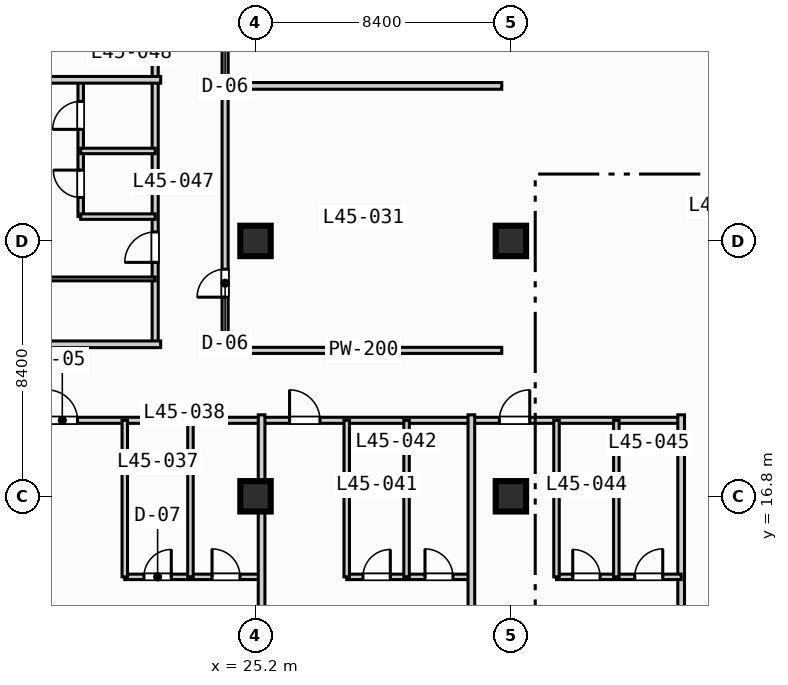
"""IFC4 building model, lengths in metres.
Left out: names, types, materials, properties, quantities, classifications, styles, units other than length and angle.
Written with IfcOpenShell. Run it as: python <this file> out.ifc"""

import sys

from ifc_helpers import new_model, si_unit, direction, frame, frame_2d, origin, origin_2d, place, context, subcontext, project, spatial, rectangle, extrude, element, fill, save


model = new_model("IFC4")
c1 = context("Model", 3, precision=1e-05, world=origin(), true_north=direction((0.0, 1.0)))
c2 = subcontext(c1, "Body", "Model", "MODEL_VIEW")
j1 = project(units=[si_unit("LENGTHUNIT", "METRE"), si_unit("PLANEANGLEUNIT", "RADIAN")], contexts=[c1])
p1 = place(None, origin())
s1 = spatial("IfcSite", under=j1, at=p1, CompositionType="ELEMENT")
p2 = place(p1, origin())
s2 = spatial("IfcBuilding", under=s1, at=p2, CompositionType="ELEMENT")
p3 = place(p2, frame((0.0, 0.0, 186.5)))
s3 = spatial("IfcBuildingStorey", under=s2, at=p3, CompositionType="ELEMENT", Elevation=186.5)
for number, where, z_axis, x_axis in (
    (1, (25.2, 16.8, 0.0), (0.0, 0.0, 1.0), (1.0, 0.0, 0.0)),
    (2, (25.2, 25.2, 0.0), (0.0, 0.0, 1.0), (1.0, 0.0, 0.0)),
    (3, (33.6, 16.8, 0.0), (0.0, 0.0, 1.0), (1.0, 0.0, 0.0)),
    (4, (33.6, 25.2, 0.0), (0.0, 0.0, 1.0), (1.0, 0.0, 0.0)),
):
    element("IfcColumn", number, at=place(p3, frame(where, z_axis=z_axis, x_axis=x_axis)), inside=s3, PredefinedType="COLUMN", context=c2, shape_type="SweptSolid", body=[
        extrude(rectangle(XDim=1.0, YDim=1.0, at=origin_2d()), origin(), (0.0, 0.0, 1.0), 3.7),
    ])
p4 = place(p3, frame((24.2, 21.6, 0.0), z_axis=(0.0, 0.0, 1.0), x_axis=(0.0, 1.0, 0.0)))
e5 = element("IfcWall", 5, at=p4, inside=s3, PredefinedType="PARTITIONING", context=c2, shape_type="SweptSolid", body=[
    extrude(rectangle(XDim=17.6, YDim=0.2, at=frame_2d((8.8, 0.0))), origin(), (0.0, 0.0, 1.0), 3.47),
])
p5 = place(p4, frame((1.75, 0.0, 0.0)))
e6 = element("IfcOpeningElement", 6, at=p5, cuts=e5, PredefinedType="OPENING", context=c2, shape_type="SweptSolid", body=[
    extrude(rectangle(XDim=0.92, YDim=2.1, at=frame_2d((0.46, 1.05))), frame((0.0, 0.11, 0.0), z_axis=(0.0, -1.0, 0.0), x_axis=(1.0, 0.0, 0.0)), (0.0, 0.0, 1.0), 0.22),
])
p6 = place(p4, frame((10.2, 0.0, 0.0)))
e7 = element("IfcOpeningElement", 7, at=p6, cuts=e5, PredefinedType="OPENING", context=c2, shape_type="SweptSolid", body=[
    extrude(rectangle(XDim=0.92, YDim=2.1, at=frame_2d((0.46, 1.05))), frame((0.0, 0.11, 0.0), z_axis=(0.0, -1.0, 0.0), x_axis=(1.0, 0.0, 0.0)), (0.0, 0.0, 1.0), 0.22),
])
p7 = place(p3, frame((24.2, 21.6, 0.0), z_axis=(0.0, 0.0, 1.0), x_axis=(1.0, 0.0, 0.0)))
e8 = element("IfcWall", 8, at=p7, inside=s3, PredefinedType="PARTITIONING", context=c2, shape_type="SweptSolid", body=[
    extrude(rectangle(XDim=9.1, YDim=0.2, at=frame_2d((4.55, 0.0))), origin(), (0.0, 0.0, 1.0), 3.47),
])
p8 = place(p3, frame((24.2, 30.3, 0.0), z_axis=(0.0, 0.0, 1.0), x_axis=(1.0, 0.0, 0.0)))
e9 = element("IfcWall", 9, at=p8, inside=s3, PredefinedType="PARTITIONING", context=c2, shape_type="SweptSolid", body=[
    extrude(rectangle(XDim=9.1, YDim=0.22, at=frame_2d((4.55, 0.0))), origin(), (0.0, 0.0, 1.0), 3.47),
])
p9 = place(p3, frame((3.4, 19.3, 0.0), z_axis=(0.0, 0.0, 1.0), x_axis=(1.0, 0.0, 0.0)))
e10 = element("IfcWall", 10, at=p9, inside=s3, PredefinedType="PARTITIONING", context=c2, shape_type="SweptSolid", body=[
    extrude(rectangle(XDim=35.8, YDim=0.2, at=frame_2d((17.9, 0.0))), origin(), (0.0, 0.0, 1.0), 3.47),
])
p10 = place(p9, frame((3.92, 0.0, 0.0)))
e11 = element("IfcOpeningElement", 11, at=p10, cuts=e10, PredefinedType="OPENING", context=c2, shape_type="SweptSolid", body=[
    extrude(rectangle(XDim=1.0, YDim=2.15, at=frame_2d((0.5, 1.075))), frame((0.0, 0.11, 0.0), z_axis=(0.0, -1.0, 0.0), x_axis=(1.0, 0.0, 0.0)), (0.0, 0.0, 1.0), 0.22),
])
p11 = place(p9, frame((14.945, 0.0, 0.0)))
e12 = element("IfcOpeningElement", 12, at=p11, cuts=e10, PredefinedType="OPENING", context=c2, shape_type="SweptSolid", body=[
    extrude(rectangle(XDim=1.0, YDim=2.15, at=frame_2d((0.5, 1.075))), frame((0.0, 0.11, 0.0), z_axis=(0.0, -1.0, 0.0), x_axis=(1.0, 0.0, 0.0)), (0.0, 0.0, 1.0), 0.22),
])
p12 = place(p9, frame((22.92, 0.0, 0.0)))
e13 = element("IfcOpeningElement", 13, at=p12, cuts=e10, PredefinedType="OPENING", context=c2, shape_type="SweptSolid", body=[
    extrude(rectangle(XDim=1.0, YDim=2.15, at=frame_2d((0.5, 1.075))), frame((0.0, 0.11, 0.0), z_axis=(0.0, -1.0, 0.0), x_axis=(1.0, 0.0, 0.0)), (0.0, 0.0, 1.0), 0.22),
])
p13 = place(p9, frame((29.82, 0.0, 0.0)))
e14 = element("IfcOpeningElement", 14, at=p13, cuts=e10, PredefinedType="OPENING", context=c2, shape_type="SweptSolid", body=[
    extrude(rectangle(XDim=1.0, YDim=2.15, at=frame_2d((0.5, 1.075))), frame((0.0, 0.11, 0.0), z_axis=(0.0, -1.0, 0.0), x_axis=(1.0, 0.0, 0.0)), (0.0, 0.0, 1.0), 0.22),
])
p14 = place(p3, frame((20.9, 14.15, 0.0), z_axis=(0.0, 0.0, 1.0), x_axis=(1.0, 0.0, 0.0)))
e15 = element("IfcWall", 15, at=p14, inside=s3, PredefinedType="PLUMBINGWALL", context=c2, shape_type="SweptSolid", body=[
    extrude(rectangle(XDim=4.5, YDim=0.18, at=frame_2d((2.25, 0.0))), origin(), (0.0, 0.0, 1.0), 3.47),
])
p15 = place(p14, frame((0.63, 0.0, 0.0)))
e16 = element("IfcOpeningElement", 16, at=p15, cuts=e15, PredefinedType="OPENING", context=c2, shape_type="SweptSolid", body=[
    extrude(rectangle(XDim=0.9, YDim=2.1, at=frame_2d((0.45, 1.05))), frame((0.0, 0.1, 0.0), z_axis=(0.0, -1.0, 0.0), x_axis=(1.0, 0.0, 0.0)), (0.0, 0.0, 1.0), 0.2),
])
p16 = place(p14, frame((2.87, 0.0, 0.0)))
e17 = element("IfcOpeningElement", 17, at=p16, cuts=e15, PredefinedType="OPENING", context=c2, shape_type="SweptSolid", body=[
    extrude(rectangle(XDim=0.92, YDim=2.1, at=frame_2d((0.46, 1.05))), frame((0.0, 0.1, 0.0), z_axis=(0.0, -1.0, 0.0), x_axis=(1.0, 0.0, 0.0)), (0.0, 0.0, 1.0), 0.2),
])
for number, where, z_axis, x_axis in (
    (18, (20.9, 14.15, 0.0), (0.0, 0.0, 1.0), (0.0, 1.0, 0.0)),
    (19, (23.06, 14.15, 0.0), (0.0, 0.0, 1.0), (0.0, 1.0, 0.0)),
):
    element("IfcWall", number, at=place(p3, frame(where, z_axis=z_axis, x_axis=x_axis)), inside=s3, PredefinedType="PLUMBINGWALL", context=c2, shape_type="SweptSolid", body=[
        extrude(rectangle(XDim=5.15, YDim=0.18, at=frame_2d((2.575, 0.0))), origin(), (0.0, 0.0, 1.0), 3.47),
    ])
p17 = place(p3, frame((25.4, 0.2, 0.0), z_axis=(0.0, 0.0, 1.0), x_axis=(0.0, 1.0, 0.0)))
e20 = element("IfcWall", 20, at=p17, inside=s3, PredefinedType="PARTITIONING", context=c2, shape_type="SweptSolid", body=[
    extrude(rectangle(XDim=19.28, YDim=0.22, at=frame_2d((9.64, 0.0))), origin(), (0.0, 0.0, 1.0), 2.82),
])
p18 = place(p3, frame((28.2, 14.15, 0.0), z_axis=(0.0, 0.0, 1.0), x_axis=(1.0, 0.0, 0.0)))
e21 = element("IfcWall", 21, at=p18, inside=s3, PredefinedType="PLUMBINGWALL", context=c2, shape_type="SweptSolid", body=[
    extrude(rectangle(XDim=4.1, YDim=0.18, at=frame_2d((2.05, 0.0))), origin(), (0.0, 0.0, 1.0), 3.47),
])
p19 = place(p18, frame((0.534, 0.0, 0.0)))
e22 = element("IfcOpeningElement", 22, at=p19, cuts=e21, PredefinedType="OPENING", context=c2, shape_type="SweptSolid", body=[
    extrude(rectangle(XDim=0.9, YDim=2.1, at=frame_2d((0.45, 1.05))), frame((0.0, 0.1, 0.0), z_axis=(0.0, -1.0, 0.0), x_axis=(1.0, 0.0, 0.0)), (0.0, 0.0, 1.0), 0.2),
])
p20 = place(p18, frame((2.574, 0.0, 0.0)))
e23 = element("IfcOpeningElement", 23, at=p20, cuts=e21, PredefinedType="OPENING", context=c2, shape_type="SweptSolid", body=[
    extrude(rectangle(XDim=0.92, YDim=2.1, at=frame_2d((0.46, 1.05))), frame((0.0, 0.1, 0.0), z_axis=(0.0, -1.0, 0.0), x_axis=(1.0, 0.0, 0.0)), (0.0, 0.0, 1.0), 0.2),
])
for number, where, z_axis, x_axis in (
    (24, (28.2, 14.15, 0.0), (0.0, 0.0, 1.0), (0.0, 1.0, 0.0)),
    (25, (30.168, 14.15, 0.0), (0.0, 0.0, 1.0), (0.0, 1.0, 0.0)),
):
    element("IfcWall", number, at=place(p3, frame(where, z_axis=z_axis, x_axis=x_axis)), inside=s3, PredefinedType="PLUMBINGWALL", context=c2, shape_type="SweptSolid", body=[
        extrude(rectangle(XDim=5.15, YDim=0.18, at=frame_2d((2.575, 0.0))), origin(), (0.0, 0.0, 1.0), 3.47),
    ])
for number, where, z_axis, x_axis in (
    (26, (32.3, 0.2, 0.0), (0.0, 0.0, 1.0), (0.0, 1.0, 0.0)),
    (27, (39.2, 0.2, 0.0), (0.0, 0.0, 1.0), (0.0, 1.0, 0.0)),
):
    element("IfcWall", number, at=place(p3, frame(where, z_axis=z_axis, x_axis=x_axis)), inside=s3, PredefinedType="PARTITIONING", context=c2, shape_type="SweptSolid", body=[
        extrude(rectangle(XDim=19.28, YDim=0.22, at=frame_2d((9.64, 0.0))), origin(), (0.0, 0.0, 1.0), 3.47),
    ])
p21 = place(p3, frame((35.1, 14.15, 0.0), z_axis=(0.0, 0.0, 1.0), x_axis=(1.0, 0.0, 0.0)))
e28 = element("IfcWall", 28, at=p21, inside=s3, PredefinedType="PLUMBINGWALL", context=c2, shape_type="SweptSolid", body=[
    extrude(rectangle(XDim=4.1, YDim=0.18, at=frame_2d((2.05, 0.0))), origin(), (0.0, 0.0, 1.0), 3.47),
])
p22 = place(p21, frame((0.534, 0.0, 0.0)))
e29 = element("IfcOpeningElement", 29, at=p22, cuts=e28, PredefinedType="OPENING", context=c2, shape_type="SweptSolid", body=[
    extrude(rectangle(XDim=0.9, YDim=2.1, at=frame_2d((0.45, 1.05))), frame((0.0, 0.1, 0.0), z_axis=(0.0, -1.0, 0.0), x_axis=(1.0, 0.0, 0.0)), (0.0, 0.0, 1.0), 0.2),
])
p23 = place(p21, frame((2.574, 0.0, 0.0)))
e30 = element("IfcOpeningElement", 30, at=p23, cuts=e28, PredefinedType="OPENING", context=c2, shape_type="SweptSolid", body=[
    extrude(rectangle(XDim=0.92, YDim=2.1, at=frame_2d((0.46, 1.05))), frame((0.0, 0.1, 0.0), z_axis=(0.0, -1.0, 0.0), x_axis=(1.0, 0.0, 0.0)), (0.0, 0.0, 1.0), 0.2),
])
for number, where, z_axis, x_axis in (
    (31, (35.1, 14.15, 0.0), (0.0, 0.0, 1.0), (0.0, 1.0, 0.0)),
    (32, (37.068, 14.15, 0.0), (0.0, 0.0, 1.0), (0.0, 1.0, 0.0)),
):
    element("IfcWall", number, at=place(p3, frame(where, z_axis=z_axis, x_axis=x_axis)), inside=s3, PredefinedType="PLUMBINGWALL", context=c2, shape_type="SweptSolid", body=[
        extrude(rectangle(XDim=5.15, YDim=0.18, at=frame_2d((2.575, 0.0))), origin(), (0.0, 0.0, 1.0), 3.47),
    ])
p24 = place(p3, frame((21.9, 21.8, 0.0), z_axis=(0.0, 0.0, 1.0), x_axis=(0.0, 1.0, 0.0)))
e33 = element("IfcWall", 33, at=p24, inside=s3, PredefinedType="PARTITIONING", context=c2, shape_type="SweptSolid", body=[
    extrude(rectangle(XDim=17.4, YDim=0.2, at=frame_2d((8.7, 0.0))), origin(), (0.0, 0.0, 1.0), 3.47),
])
p25 = place(p24, frame((2.695, 0.0, 0.0)))
e34 = element("IfcOpeningElement", 34, at=p25, cuts=e33, PredefinedType="OPENING", context=c2, shape_type="SweptSolid", body=[
    extrude(rectangle(XDim=1.0, YDim=2.15, at=frame_2d((0.5, 1.075))), frame((0.0, 0.11, 0.0), z_axis=(0.0, -1.0, 0.0), x_axis=(1.0, 0.0, 0.0)), (0.0, 0.0, 1.0), 0.22),
])
p26 = place(p24, frame((11.395, 0.0, 0.0)))
e35 = element("IfcOpeningElement", 35, at=p26, cuts=e33, PredefinedType="OPENING", context=c2, shape_type="SweptSolid", body=[
    extrude(rectangle(XDim=1.0, YDim=2.15, at=frame_2d((0.5, 1.075))), frame((0.0, 0.11, 0.0), z_axis=(0.0, -1.0, 0.0), x_axis=(1.0, 0.0, 0.0)), (0.0, 0.0, 1.0), 0.22),
])
p27 = place(p3, frame((0.2, 21.8, 0.0), z_axis=(0.0, 0.0, 1.0), x_axis=(1.0, 0.0, 0.0)))
e36 = element("IfcWall", 36, at=p27, inside=s3, PredefinedType="PARTITIONING", context=c2, shape_type="SweptSolid", body=[
    extrude(rectangle(XDim=21.88, YDim=0.22, at=frame_2d((10.94, 0.0))), origin(), (0.0, 0.0, 1.0), 3.47),
])
p28 = place(p3, frame((19.45, 26.0, 0.0), z_axis=(0.0, 0.0, 1.0), x_axis=(0.0, 1.0, 0.0)))
e37 = element("IfcWall", 37, at=p28, inside=s3, PredefinedType="PLUMBINGWALL", context=c2, shape_type="SweptSolid", body=[
    extrude(rectangle(XDim=4.5, YDim=0.18, at=frame_2d((2.25, 0.0))), origin(), (0.0, 0.0, 1.0), 3.47),
])
p29 = place(p28, frame((0.63, 0.0, 0.0)))
e38 = element("IfcOpeningElement", 38, at=p29, cuts=e37, PredefinedType="OPENING", context=c2, shape_type="SweptSolid", body=[
    extrude(rectangle(XDim=0.9, YDim=2.1, at=frame_2d((0.45, 1.05))), frame((0.0, 0.1, 0.0), z_axis=(0.0, -1.0, 0.0), x_axis=(1.0, 0.0, 0.0)), (0.0, 0.0, 1.0), 0.2),
])
p30 = place(p28, frame((2.87, 0.0, 0.0)))
e39 = element("IfcOpeningElement", 39, at=p30, cuts=e37, PredefinedType="OPENING", context=c2, shape_type="SweptSolid", body=[
    extrude(rectangle(XDim=0.92, YDim=2.1, at=frame_2d((0.46, 1.05))), frame((0.0, 0.1, 0.0), z_axis=(0.0, -1.0, 0.0), x_axis=(1.0, 0.0, 0.0)), (0.0, 0.0, 1.0), 0.2),
])
for number, where, z_axis, x_axis in (
    (40, (19.45, 26.0, 0.0), (0.0, 0.0, 1.0), (1.0, 0.0, 0.0)),
    (41, (19.45, 28.16, 0.0), (0.0, 0.0, 1.0), (1.0, 0.0, 0.0)),
):
    element("IfcWall", number, at=place(p3, frame(where, z_axis=z_axis, x_axis=x_axis)), inside=s3, PredefinedType="PLUMBINGWALL", context=c2, shape_type="SweptSolid", body=[
        extrude(rectangle(XDim=2.45, YDim=0.18, at=frame_2d((1.225, 0.0))), origin(), (0.0, 0.0, 1.0), 3.47),
    ])
p31 = place(p3, frame((0.35, 23.95, 0.0), z_axis=(0.0, 0.0, 1.0), x_axis=(1.0, 0.0, 0.0)))
e42 = element("IfcWall", 42, at=p31, inside=s3, PredefinedType="PARTITIONING", context=c2, shape_type="SweptSolid", body=[
    extrude(rectangle(XDim=21.55, YDim=0.125, at=frame_2d((10.775, 0.0))), origin(), (0.0, 0.0, 1.0), 3.47),
])
p32 = place(p31, frame((9.09, 0.0, 0.0)))
e43 = element("IfcOpeningElement", 43, at=p32, cuts=e42, PredefinedType="OPENING", context=c2, shape_type="SweptSolid", body=[
    extrude(rectangle(XDim=0.92, YDim=2.1, at=frame_2d((0.46, 1.05))), frame((0.0, 0.073, 0.0), z_axis=(0.0, -1.0, 0.0), x_axis=(1.0, 0.0, 0.0)), (0.0, 0.0, 1.0), 0.145),
])
p33 = place(p3, frame((0.2, 30.5, 0.0), z_axis=(0.0, 0.0, 1.0), x_axis=(1.0, 0.0, 0.0)))
e44 = element("IfcWall", 44, at=p33, inside=s3, PredefinedType="PARTITIONING", context=c2, shape_type="SweptSolid", body=[
    extrude(rectangle(XDim=21.88, YDim=0.22, at=frame_2d((10.94, 0.0))), origin(), (0.0, 0.0, 1.0), 3.47),
])
p34 = place(p5, origin())
e45 = element("IfcDoor", 45, at=p34, inside=s3, OperationType="SINGLE_SWING_LEFT", PredefinedType="DOOR", context=c2, shape_type="SweptSolid", body=[
    extrude(rectangle(XDim=0.92, YDim=2.1, at=frame_2d((0.46, 1.05))), frame((0.0, 0.025, 0.0), z_axis=(0.0, -1.0, 0.0), x_axis=(1.0, 0.0, 0.0)), (0.0, 0.0, 1.0), 0.05),
])
fill(e6, e45)
p35 = place(p11, origin())
e46 = element("IfcDoor", 46, at=p35, inside=s3, OperationType="SINGLE_SWING_LEFT", PredefinedType="DOOR", context=c2, shape_type="SweptSolid", body=[
    extrude(rectangle(XDim=1.0, YDim=2.15, at=frame_2d((0.5, 1.075))), frame((0.0, 0.025, 0.0), z_axis=(0.0, -1.0, 0.0), x_axis=(1.0, 0.0, 0.0)), (0.0, 0.0, 1.0), 0.05),
])
fill(e12, e46)
p36 = place(p12, origin())
e47 = element("IfcDoor", 47, at=p36, inside=s3, OperationType="SINGLE_SWING_LEFT", PredefinedType="DOOR", context=c2, shape_type="SweptSolid", body=[
    extrude(rectangle(XDim=1.0, YDim=2.15, at=frame_2d((0.5, 1.075))), frame((0.0, 0.025, 0.0), z_axis=(0.0, -1.0, 0.0), x_axis=(1.0, 0.0, 0.0)), (0.0, 0.0, 1.0), 0.05),
])
fill(e13, e47)
p37 = place(p13, origin())
e48 = element("IfcDoor", 48, at=p37, inside=s3, OperationType="SINGLE_SWING_RIGHT", PredefinedType="DOOR", context=c2, shape_type="SweptSolid", body=[
    extrude(rectangle(XDim=1.0, YDim=2.15, at=frame_2d((0.5, 1.075))), frame((0.0, 0.025, 0.0), z_axis=(0.0, -1.0, 0.0), x_axis=(1.0, 0.0, 0.0)), (0.0, 0.0, 1.0), 0.05),
])
fill(e14, e48)
p38 = place(p15, origin())
e49 = element("IfcDoor", 49, at=p38, inside=s3, OperationType="SINGLE_SWING_RIGHT", PredefinedType="DOOR", context=c2, shape_type="SweptSolid", body=[
    extrude(rectangle(XDim=0.9, YDim=2.1, at=frame_2d((0.45, 1.05))), frame((0.0, 0.025, 0.0), z_axis=(0.0, -1.0, 0.0), x_axis=(1.0, 0.0, 0.0)), (0.0, 0.0, 1.0), 0.05),
])
fill(e16, e49)
p39 = place(p16, origin())
e50 = element("IfcDoor", 50, at=p39, inside=s3, OperationType="SINGLE_SWING_LEFT", PredefinedType="DOOR", context=c2, shape_type="SweptSolid", body=[
    extrude(rectangle(XDim=0.92, YDim=2.1, at=frame_2d((0.46, 1.05))), frame((0.0, 0.025, 0.0), z_axis=(0.0, -1.0, 0.0), x_axis=(1.0, 0.0, 0.0)), (0.0, 0.0, 1.0), 0.05),
])
fill(e17, e50)
p40 = place(p19, origin())
e51 = element("IfcDoor", 51, at=p40, inside=s3, OperationType="SINGLE_SWING_RIGHT", PredefinedType="DOOR", context=c2, shape_type="SweptSolid", body=[
    extrude(rectangle(XDim=0.9, YDim=2.1, at=frame_2d((0.45, 1.05))), frame((0.0, 0.025, 0.0), z_axis=(0.0, -1.0, 0.0), x_axis=(1.0, 0.0, 0.0)), (0.0, 0.0, 1.0), 0.05),
])
fill(e22, e51)
p41 = place(p20, origin())
e52 = element("IfcDoor", 52, at=p41, inside=s3, OperationType="SINGLE_SWING_LEFT", PredefinedType="DOOR", context=c2, shape_type="SweptSolid", body=[
    extrude(rectangle(XDim=0.92, YDim=2.1, at=frame_2d((0.46, 1.05))), frame((0.0, 0.025, 0.0), z_axis=(0.0, -1.0, 0.0), x_axis=(1.0, 0.0, 0.0)), (0.0, 0.0, 1.0), 0.05),
])
fill(e23, e52)
p42 = place(p22, origin())
e53 = element("IfcDoor", 53, at=p42, inside=s3, OperationType="SINGLE_SWING_LEFT", PredefinedType="DOOR", context=c2, shape_type="SweptSolid", body=[
    extrude(rectangle(XDim=0.9, YDim=2.1, at=frame_2d((0.45, 1.05))), frame((0.0, 0.025, 0.0), z_axis=(0.0, -1.0, 0.0), x_axis=(1.0, 0.0, 0.0)), (0.0, 0.0, 1.0), 0.05),
])
fill(e29, e53)
p43 = place(p23, origin())
e54 = element("IfcDoor", 54, at=p43, inside=s3, OperationType="SINGLE_SWING_RIGHT", PredefinedType="DOOR", context=c2, shape_type="SweptSolid", body=[
    extrude(rectangle(XDim=0.92, YDim=2.1, at=frame_2d((0.46, 1.05))), frame((0.0, 0.025, 0.0), z_axis=(0.0, -1.0, 0.0), x_axis=(1.0, 0.0, 0.0)), (0.0, 0.0, 1.0), 0.05),
])
fill(e30, e54)
p44 = place(p25, origin())
e55 = element("IfcDoor", 55, at=p44, inside=s3, OperationType="SINGLE_SWING_LEFT", PredefinedType="DOOR", context=c2, shape_type="SweptSolid", body=[
    extrude(rectangle(XDim=1.0, YDim=2.15, at=frame_2d((0.5, 1.075))), frame((0.0, 0.025, 0.0), z_axis=(0.0, -1.0, 0.0), x_axis=(1.0, 0.0, 0.0)), (0.0, 0.0, 1.0), 0.05),
])
fill(e34, e55)
p45 = place(p29, origin())
e56 = element("IfcDoor", 56, at=p45, inside=s3, OperationType="SINGLE_SWING_RIGHT", PredefinedType="DOOR", context=c2, shape_type="SweptSolid", body=[
    extrude(rectangle(XDim=0.9, YDim=2.1, at=frame_2d((0.45, 1.05))), frame((0.0, 0.025, 0.0), z_axis=(0.0, -1.0, 0.0), x_axis=(1.0, 0.0, 0.0)), (0.0, 0.0, 1.0), 0.05),
])
fill(e38, e56)
p46 = place(p30, origin())
e57 = element("IfcDoor", 57, at=p46, inside=s3, OperationType="SINGLE_SWING_LEFT", PredefinedType="DOOR", context=c2, shape_type="SweptSolid", body=[
    extrude(rectangle(XDim=0.92, YDim=2.1, at=frame_2d((0.46, 1.05))), frame((0.0, 0.025, 0.0), z_axis=(0.0, -1.0, 0.0), x_axis=(1.0, 0.0, 0.0)), (0.0, 0.0, 1.0), 0.05),
])
fill(e39, e57)
save(model, sys.argv[1])
